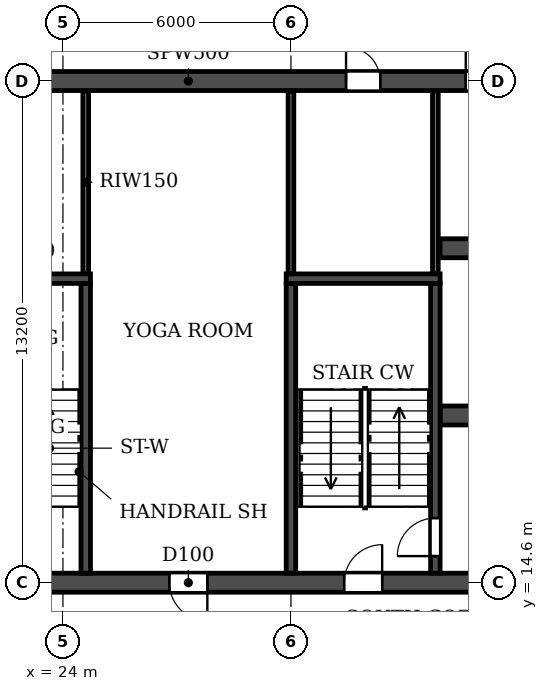
"""IFC4 building model, lengths in metres.
Left out: names, types, materials, properties, quantities, classifications, styles, units other than length and angle.
Written with IfcOpenShell. Run it as: python <this file> out.ifc"""

import sys

from ifc_helpers import new_model, si_unit, direction, frame, frame_2d, origin, place, context, subcontext, project, spatial, rectangle, extrude, element, fill, save


model = new_model("IFC4")
c1 = context("Model", 3, precision=1e-05, world=origin(), true_north=direction((0.0, 1.0)))
c2 = subcontext(c1, "Body", "Model", "MODEL_VIEW")
j1 = project(units=[si_unit("LENGTHUNIT", "METRE"), si_unit("PLANEANGLEUNIT", "RADIAN")], contexts=[c1])
p1 = place(None, origin())
s1 = spatial("IfcSite", under=j1, at=p1, CompositionType="ELEMENT")
p2 = place(p1, origin())
s2 = spatial("IfcBuilding", under=s1, at=p2, CompositionType="ELEMENT")
p3 = place(p2, frame((0.0, 0.0, 76.2)))
s3 = spatial("IfcBuildingStorey", under=s2, at=p3, CompositionType="ELEMENT", Elevation=76.2)
p4 = place(p3, frame((8.6, 14.6, 0.0), z_axis=(0.0, 0.0, 1.0), x_axis=(1.0, 0.0, 0.0)))
e1 = element("IfcWall", 1, at=p4, inside=s3, PredefinedType="SOLIDWALL", context=c2, shape_type="SweptSolid", body=[
    extrude(rectangle(XDim=84.8, YDim=0.5, at=frame_2d((42.4, 0.0))), origin(), (0.0, 0.0, 1.0), 3.06),
])
p5 = place(p4, frame((2.25, 0.0, 0.0)))
e2 = element("IfcOpeningElement", 2, at=p5, cuts=e1, PredefinedType="OPENING", context=c2, shape_type="SweptSolid", body=[
    extrude(rectangle(XDim=1.0, YDim=2.1, at=frame_2d((0.5, 1.05))), frame((0.0, 0.26, 0.0), z_axis=(0.0, -1.0, 0.0), x_axis=(1.0, 0.0, 0.0)), (0.0, 0.0, 1.0), 0.52),
])
p6 = place(p4, frame((6.95, 0.0, 0.0)))
e3 = element("IfcOpeningElement", 3, at=p6, cuts=e1, PredefinedType="OPENING", context=c2, shape_type="SweptSolid", body=[
    extrude(rectangle(XDim=1.0, YDim=2.1, at=frame_2d((0.5, 1.05))), frame((0.0, 0.26, 0.0), z_axis=(0.0, -1.0, 0.0), x_axis=(1.0, 0.0, 0.0)), (0.0, 0.0, 1.0), 0.52),
])
p7 = place(p4, frame((10.3, 0.0, 0.0)))
e4 = element("IfcOpeningElement", 4, at=p7, cuts=e1, PredefinedType="OPENING", context=c2, shape_type="SweptSolid", body=[
    extrude(rectangle(XDim=1.0, YDim=2.1, at=frame_2d((0.5, 1.05))), frame((0.0, 0.26, 0.0), z_axis=(0.0, -1.0, 0.0), x_axis=(1.0, 0.0, 0.0)), (0.0, 0.0, 1.0), 0.52),
])
p8 = place(p4, frame((18.2, 0.0, 0.0)))
e5 = element("IfcOpeningElement", 5, at=p8, cuts=e1, PredefinedType="OPENING", context=c2, shape_type="SweptSolid", body=[
    extrude(rectangle(XDim=1.0, YDim=2.1, at=frame_2d((0.5, 1.05))), frame((0.0, 0.26, 0.0), z_axis=(0.0, -1.0, 0.0), x_axis=(1.0, 0.0, 0.0)), (0.0, 0.0, 1.0), 0.52),
])
p9 = place(p4, frame((22.8, 0.0, 0.0)))
e6 = element("IfcOpeningElement", 6, at=p9, cuts=e1, PredefinedType="OPENING", context=c2, shape_type="SweptSolid", body=[
    extrude(rectangle(XDim=1.0, YDim=2.1, at=frame_2d((0.5, 1.05))), frame((0.0, 0.26, 0.0), z_axis=(0.0, -1.0, 0.0), x_axis=(1.0, 0.0, 0.0)), (0.0, 0.0, 1.0), 0.52),
])
p10 = place(p4, frame((35.4, 0.0, 0.0)))
e7 = element("IfcOpeningElement", 7, at=p10, cuts=e1, PredefinedType="OPENING", context=c2, shape_type="SweptSolid", body=[
    extrude(rectangle(XDim=1.0, YDim=2.1, at=frame_2d((0.5, 1.05))), frame((0.0, 0.26, 0.0), z_axis=(0.0, -1.0, 0.0), x_axis=(1.0, 0.0, 0.0)), (0.0, 0.0, 1.0), 0.52),
])
p11 = place(p4, frame((39.3, 0.0, 0.0)))
e8 = element("IfcOpeningElement", 8, at=p11, cuts=e1, PredefinedType="OPENING", context=c2, shape_type="SweptSolid", body=[
    extrude(rectangle(XDim=1.0, YDim=2.1, at=frame_2d((0.5, 1.05))), frame((0.0, 0.26, 0.0), z_axis=(0.0, -1.0, 0.0), x_axis=(1.0, 0.0, 0.0)), (0.0, 0.0, 1.0), 0.52),
])
p12 = place(p4, frame((41.9, 0.0, 0.0)))
e9 = element("IfcOpeningElement", 9, at=p12, cuts=e1, PredefinedType="OPENING", context=c2, shape_type="SweptSolid", body=[
    extrude(rectangle(XDim=1.0, YDim=2.1, at=frame_2d((0.5, 1.05))), frame((0.0, 0.26, 0.0), z_axis=(0.0, -1.0, 0.0), x_axis=(1.0, 0.0, 0.0)), (0.0, 0.0, 1.0), 0.52),
])
p13 = place(p4, frame((44.5, 0.0, 0.0)))
e10 = element("IfcOpeningElement", 10, at=p13, cuts=e1, PredefinedType="OPENING", context=c2, shape_type="SweptSolid", body=[
    extrude(rectangle(XDim=1.0, YDim=2.1, at=frame_2d((0.5, 1.05))), frame((0.0, 0.26, 0.0), z_axis=(0.0, -1.0, 0.0), x_axis=(1.0, 0.0, 0.0)), (0.0, 0.0, 1.0), 0.52),
])
p14 = place(p4, frame((48.4, 0.0, 0.0)))
e11 = element("IfcOpeningElement", 11, at=p14, cuts=e1, PredefinedType="OPENING", context=c2, shape_type="SweptSolid", body=[
    extrude(rectangle(XDim=1.0, YDim=2.1, at=frame_2d((0.5, 1.05))), frame((0.0, 0.26, 0.0), z_axis=(0.0, -1.0, 0.0), x_axis=(1.0, 0.0, 0.0)), (0.0, 0.0, 1.0), 0.52),
])
p15 = place(p4, frame((61.0, 0.0, 0.0)))
e12 = element("IfcOpeningElement", 12, at=p15, cuts=e1, PredefinedType="OPENING", context=c2, shape_type="SweptSolid", body=[
    extrude(rectangle(XDim=1.0, YDim=2.1, at=frame_2d((0.5, 1.05))), frame((0.0, 0.26, 0.0), z_axis=(0.0, -1.0, 0.0), x_axis=(1.0, 0.0, 0.0)), (0.0, 0.0, 1.0), 0.52),
])
p16 = place(p4, frame((65.6, 0.0, 0.0)))
e13 = element("IfcOpeningElement", 13, at=p16, cuts=e1, PredefinedType="OPENING", context=c2, shape_type="SweptSolid", body=[
    extrude(rectangle(XDim=1.0, YDim=2.1, at=frame_2d((0.5, 1.05))), frame((0.0, 0.26, 0.0), z_axis=(0.0, -1.0, 0.0), x_axis=(1.0, 0.0, 0.0)), (0.0, 0.0, 1.0), 0.52),
])
p17 = place(p4, frame((73.5, 0.0, 0.0)))
e14 = element("IfcOpeningElement", 14, at=p17, cuts=e1, PredefinedType="OPENING", context=c2, shape_type="SweptSolid", body=[
    extrude(rectangle(XDim=1.0, YDim=2.1, at=frame_2d((0.5, 1.05))), frame((0.0, 0.26, 0.0), z_axis=(0.0, -1.0, 0.0), x_axis=(1.0, 0.0, 0.0)), (0.0, 0.0, 1.0), 0.52),
])
p18 = place(p4, frame((76.55, 0.0, 0.0)))
e15 = element("IfcOpeningElement", 15, at=p18, cuts=e1, PredefinedType="OPENING", context=c2, shape_type="SweptSolid", body=[
    extrude(rectangle(XDim=1.0, YDim=2.1, at=frame_2d((0.5, 1.05))), frame((0.0, 0.26, 0.0), z_axis=(0.0, -1.0, 0.0), x_axis=(1.0, 0.0, 0.0)), (0.0, 0.0, 1.0), 0.52),
])
p19 = place(p4, frame((81.0, 0.0, 0.0)))
e16 = element("IfcOpeningElement", 16, at=p19, cuts=e1, PredefinedType="OPENING", context=c2, shape_type="SweptSolid", body=[
    extrude(rectangle(XDim=1.5, YDim=2.1, at=frame_2d((0.75, 1.05))), frame((0.0, 0.26, 0.0), z_axis=(0.0, -1.0, 0.0), x_axis=(1.0, 0.0, 0.0)), (0.0, 0.0, 1.0), 0.52),
])
p20 = place(p3, frame((8.6, 27.8, 0.0), z_axis=(0.0, 0.0, 1.0), x_axis=(1.0, 0.0, 0.0)))
e17 = element("IfcWall", 17, at=p20, inside=s3, PredefinedType="SOLIDWALL", context=c2, shape_type="SweptSolid", body=[
    extrude(rectangle(XDim=84.8, YDim=0.5, at=frame_2d((42.4, 0.0))), origin(), (0.0, 0.0, 1.0), 3.06),
])
p21 = place(p20, frame((2.0, 0.0, 0.0)))
e18 = element("IfcOpeningElement", 18, at=p21, cuts=e17, PredefinedType="OPENING", context=c2, shape_type="SweptSolid", body=[
    extrude(rectangle(XDim=1.5, YDim=2.1, at=frame_2d((0.75, 1.05))), frame((0.0, 0.26, 0.0), z_axis=(0.0, -1.0, 0.0), x_axis=(1.0, 0.0, 0.0)), (0.0, 0.0, 1.0), 0.52),
])
p22 = place(p20, frame((6.95, 0.0, 0.0)))
e19 = element("IfcOpeningElement", 19, at=p22, cuts=e17, PredefinedType="OPENING", context=c2, shape_type="SweptSolid", body=[
    extrude(rectangle(XDim=1.0, YDim=2.1, at=frame_2d((0.5, 1.05))), frame((0.0, 0.26, 0.0), z_axis=(0.0, -1.0, 0.0), x_axis=(1.0, 0.0, 0.0)), (0.0, 0.0, 1.0), 0.52),
])
p23 = place(p20, frame((10.3, 0.0, 0.0)))
e20 = element("IfcOpeningElement", 20, at=p23, cuts=e17, PredefinedType="OPENING", context=c2, shape_type="SweptSolid", body=[
    extrude(rectangle(XDim=1.0, YDim=2.1, at=frame_2d((0.5, 1.05))), frame((0.0, 0.26, 0.0), z_axis=(0.0, -1.0, 0.0), x_axis=(1.0, 0.0, 0.0)), (0.0, 0.0, 1.0), 0.52),
])
p24 = place(p20, frame((13.65, 0.0, 0.0)))
e21 = element("IfcOpeningElement", 21, at=p24, cuts=e17, PredefinedType="OPENING", context=c2, shape_type="SweptSolid", body=[
    extrude(rectangle(XDim=0.9, YDim=2.1, at=frame_2d((0.45, 1.05))), frame((0.0, 0.26, 0.0), z_axis=(0.0, -1.0, 0.0), x_axis=(1.0, 0.0, 0.0)), (0.0, 0.0, 1.0), 0.52),
])
p25 = place(p20, frame((22.85, 0.0, 0.0)))
e22 = element("IfcOpeningElement", 22, at=p25, cuts=e17, PredefinedType="OPENING", context=c2, shape_type="SweptSolid", body=[
    extrude(rectangle(XDim=0.9, YDim=2.1, at=frame_2d((0.45, 1.05))), frame((0.0, 0.26, 0.0), z_axis=(0.0, -1.0, 0.0), x_axis=(1.0, 0.0, 0.0)), (0.0, 0.0, 1.0), 0.52),
])
p26 = place(p20, frame((26.0, 0.0, 0.0)))
e23 = element("IfcOpeningElement", 23, at=p26, cuts=e17, PredefinedType="OPENING", context=c2, shape_type="SweptSolid", body=[
    extrude(rectangle(XDim=1.0, YDim=2.1, at=frame_2d((0.5, 1.05))), frame((0.0, 0.26, 0.0), z_axis=(0.0, -1.0, 0.0), x_axis=(1.0, 0.0, 0.0)), (0.0, 0.0, 1.0), 0.52),
])
p27 = place(p20, frame((31.2, 0.0, 0.0)))
e24 = element("IfcOpeningElement", 24, at=p27, cuts=e17, PredefinedType="OPENING", context=c2, shape_type="SweptSolid", body=[
    extrude(rectangle(XDim=1.0, YDim=2.1, at=frame_2d((0.5, 1.05))), frame((0.0, 0.26, 0.0), z_axis=(0.0, -1.0, 0.0), x_axis=(1.0, 0.0, 0.0)), (0.0, 0.0, 1.0), 0.52),
])
p28 = place(p20, frame((39.0, 0.0, 0.0)))
e25 = element("IfcOpeningElement", 25, at=p28, cuts=e17, PredefinedType="OPENING", context=c2, shape_type="SweptSolid", body=[
    extrude(rectangle(XDim=1.0, YDim=2.1, at=frame_2d((0.5, 1.05))), frame((0.0, 0.26, 0.0), z_axis=(0.0, -1.0, 0.0), x_axis=(1.0, 0.0, 0.0)), (0.0, 0.0, 1.0), 0.52),
])
p29 = place(p20, frame((41.9, 0.0, 0.0)))
e26 = element("IfcOpeningElement", 26, at=p29, cuts=e17, PredefinedType="OPENING", context=c2, shape_type="SweptSolid", body=[
    extrude(rectangle(XDim=1.0, YDim=2.1, at=frame_2d((0.5, 1.05))), frame((0.0, 0.26, 0.0), z_axis=(0.0, -1.0, 0.0), x_axis=(1.0, 0.0, 0.0)), (0.0, 0.0, 1.0), 0.52),
])
p30 = place(p20, frame((44.8, 0.0, 0.0)))
e27 = element("IfcOpeningElement", 27, at=p30, cuts=e17, PredefinedType="OPENING", context=c2, shape_type="SweptSolid", body=[
    extrude(rectangle(XDim=1.0, YDim=2.1, at=frame_2d((0.5, 1.05))), frame((0.0, 0.26, 0.0), z_axis=(0.0, -1.0, 0.0), x_axis=(1.0, 0.0, 0.0)), (0.0, 0.0, 1.0), 0.52),
])
p31 = place(p20, frame((48.7, 0.0, 0.0)))
e28 = element("IfcOpeningElement", 28, at=p31, cuts=e17, PredefinedType="OPENING", context=c2, shape_type="SweptSolid", body=[
    extrude(rectangle(XDim=1.0, YDim=2.1, at=frame_2d((0.5, 1.05))), frame((0.0, 0.26, 0.0), z_axis=(0.0, -1.0, 0.0), x_axis=(1.0, 0.0, 0.0)), (0.0, 0.0, 1.0), 0.52),
])
p32 = place(p20, frame((55.2, 0.0, 0.0)))
e29 = element("IfcOpeningElement", 29, at=p32, cuts=e17, PredefinedType="OPENING", context=c2, shape_type="SweptSolid", body=[
    extrude(rectangle(XDim=1.0, YDim=2.1, at=frame_2d((0.5, 1.05))), frame((0.0, 0.26, 0.0), z_axis=(0.0, -1.0, 0.0), x_axis=(1.0, 0.0, 0.0)), (0.0, 0.0, 1.0), 0.52),
])
p33 = place(p20, frame((61.05, 0.0, 0.0)))
e30 = element("IfcOpeningElement", 30, at=p33, cuts=e17, PredefinedType="OPENING", context=c2, shape_type="SweptSolid", body=[
    extrude(rectangle(XDim=0.9, YDim=2.1, at=frame_2d((0.45, 1.05))), frame((0.0, 0.26, 0.0), z_axis=(0.0, -1.0, 0.0), x_axis=(1.0, 0.0, 0.0)), (0.0, 0.0, 1.0), 0.52),
])
p34 = place(p20, frame((70.25, 0.0, 0.0)))
e31 = element("IfcOpeningElement", 31, at=p34, cuts=e17, PredefinedType="OPENING", context=c2, shape_type="SweptSolid", body=[
    extrude(rectangle(XDim=0.9, YDim=2.1, at=frame_2d((0.45, 1.05))), frame((0.0, 0.26, 0.0), z_axis=(0.0, -1.0, 0.0), x_axis=(1.0, 0.0, 0.0)), (0.0, 0.0, 1.0), 0.52),
])
p35 = place(p20, frame((73.5, 0.0, 0.0)))
e32 = element("IfcOpeningElement", 32, at=p35, cuts=e17, PredefinedType="OPENING", context=c2, shape_type="SweptSolid", body=[
    extrude(rectangle(XDim=1.0, YDim=2.1, at=frame_2d((0.5, 1.05))), frame((0.0, 0.26, 0.0), z_axis=(0.0, -1.0, 0.0), x_axis=(1.0, 0.0, 0.0)), (0.0, 0.0, 1.0), 0.52),
])
p36 = place(p20, frame((76.25, 0.0, 0.0)))
e33 = element("IfcOpeningElement", 33, at=p36, cuts=e17, PredefinedType="OPENING", context=c2, shape_type="SweptSolid", body=[
    extrude(rectangle(XDim=1.0, YDim=2.1, at=frame_2d((0.5, 1.05))), frame((0.0, 0.26, 0.0), z_axis=(0.0, -1.0, 0.0), x_axis=(1.0, 0.0, 0.0)), (0.0, 0.0, 1.0), 0.52),
])
p37 = place(p20, frame((80.95, 0.0, 0.0)))
e34 = element("IfcOpeningElement", 34, at=p37, cuts=e17, PredefinedType="OPENING", context=c2, shape_type="SweptSolid", body=[
    extrude(rectangle(XDim=1.0, YDim=2.1, at=frame_2d((0.5, 1.05))), frame((0.0, 0.26, 0.0), z_axis=(0.0, -1.0, 0.0), x_axis=(1.0, 0.0, 0.0)), (0.0, 0.0, 1.0), 0.52),
])
p38 = place(p3, frame((33.925, 19.0, 0.0), z_axis=(0.0, 0.0, 1.0), x_axis=(1.0, 0.0, 0.0)))
e35 = element("IfcWall", 35, at=p38, inside=s3, PredefinedType="SOLIDWALL", context=c2, shape_type="SweptSolid", body=[
    extrude(rectangle(XDim=34.15, YDim=0.5, at=frame_2d((17.075, 0.0))), origin(), (0.0, 0.0, 1.0), 3.06),
])
p39 = place(p38, frame((16.175, 0.0, 0.0)))
e36 = element("IfcOpeningElement", 36, at=p39, cuts=e35, PredefinedType="OPENING", context=c2, shape_type="SweptSolid", body=[
    extrude(rectangle(XDim=1.8, YDim=2.1, at=frame_2d((0.9, 1.05))), frame((0.0, 0.26, 0.0), z_axis=(0.0, -1.0, 0.0), x_axis=(1.0, 0.0, 0.0)), (0.0, 0.0, 1.0), 0.52),
])
p40 = place(p38, frame((1.525, 0.0, 0.0)))
e37 = element("IfcOpeningElement", 37, at=p40, cuts=e35, PredefinedType="OPENING", context=c2, shape_type="SweptSolid", body=[
    extrude(rectangle(XDim=1.8, YDim=2.1, at=frame_2d((0.9, 1.05))), frame((0.0, 0.26, 0.0), z_axis=(0.0, -1.0, 0.0), x_axis=(1.0, 0.0, 0.0)), (0.0, 0.0, 1.0), 0.52),
])
p41 = place(p38, frame((8.725, 0.0, 0.0)))
e38 = element("IfcOpeningElement", 38, at=p41, cuts=e35, PredefinedType="OPENING", context=c2, shape_type="SweptSolid", body=[
    extrude(rectangle(XDim=1.1, YDim=2.1, at=frame_2d((0.55, 1.05))), frame((0.0, 0.26, 0.0), z_axis=(0.0, -1.0, 0.0), x_axis=(1.0, 0.0, 0.0)), (0.0, 0.0, 1.0), 0.52),
])
p42 = place(p38, frame((11.325, 0.0, 0.0)))
e39 = element("IfcOpeningElement", 39, at=p42, cuts=e35, PredefinedType="OPENING", context=c2, shape_type="SweptSolid", body=[
    extrude(rectangle(XDim=1.1, YDim=2.1, at=frame_2d((0.55, 1.05))), frame((0.0, 0.26, 0.0), z_axis=(0.0, -1.0, 0.0), x_axis=(1.0, 0.0, 0.0)), (0.0, 0.0, 1.0), 0.52),
])
p43 = place(p38, frame((13.925, 0.0, 0.0)))
e40 = element("IfcOpeningElement", 40, at=p43, cuts=e35, PredefinedType="OPENING", context=c2, shape_type="SweptSolid", body=[
    extrude(rectangle(XDim=1.1, YDim=2.1, at=frame_2d((0.55, 1.05))), frame((0.0, 0.26, 0.0), z_axis=(0.0, -1.0, 0.0), x_axis=(1.0, 0.0, 0.0)), (0.0, 0.0, 1.0), 0.52),
])
p44 = place(p38, frame((19.125, 0.0, 0.0)))
e41 = element("IfcOpeningElement", 41, at=p44, cuts=e35, PredefinedType="OPENING", context=c2, shape_type="SweptSolid", body=[
    extrude(rectangle(XDim=1.1, YDim=2.1, at=frame_2d((0.55, 1.05))), frame((0.0, 0.26, 0.0), z_axis=(0.0, -1.0, 0.0), x_axis=(1.0, 0.0, 0.0)), (0.0, 0.0, 1.0), 0.52),
])
p45 = place(p38, frame((21.725, 0.0, 0.0)))
e42 = element("IfcOpeningElement", 42, at=p45, cuts=e35, PredefinedType="OPENING", context=c2, shape_type="SweptSolid", body=[
    extrude(rectangle(XDim=1.1, YDim=2.1, at=frame_2d((0.55, 1.05))), frame((0.0, 0.26, 0.0), z_axis=(0.0, -1.0, 0.0), x_axis=(1.0, 0.0, 0.0)), (0.0, 0.0, 1.0), 0.52),
])
p46 = place(p38, frame((24.325, 0.0, 0.0)))
e43 = element("IfcOpeningElement", 43, at=p46, cuts=e35, PredefinedType="OPENING", context=c2, shape_type="SweptSolid", body=[
    extrude(rectangle(XDim=1.1, YDim=2.1, at=frame_2d((0.55, 1.05))), frame((0.0, 0.26, 0.0), z_axis=(0.0, -1.0, 0.0), x_axis=(1.0, 0.0, 0.0)), (0.0, 0.0, 1.0), 0.52),
])
p47 = place(p38, frame((30.825, 0.0, 0.0)))
e44 = element("IfcOpeningElement", 44, at=p47, cuts=e35, PredefinedType="OPENING", context=c2, shape_type="SweptSolid", body=[
    extrude(rectangle(XDim=1.8, YDim=2.1, at=frame_2d((0.9, 1.05))), frame((0.0, 0.26, 0.0), z_axis=(0.0, -1.0, 0.0), x_axis=(1.0, 0.0, 0.0)), (0.0, 0.0, 1.0), 0.52),
])
p48 = place(p3, frame((33.925, 23.4, 0.0), z_axis=(0.0, 0.0, 1.0), x_axis=(1.0, 0.0, 0.0)))
e45 = element("IfcWall", 45, at=p48, inside=s3, PredefinedType="SOLIDWALL", context=c2, shape_type="SweptSolid", body=[
    extrude(rectangle(XDim=34.15, YDim=0.5, at=frame_2d((17.075, 0.0))), origin(), (0.0, 0.0, 1.0), 3.06),
])
p49 = place(p48, frame((16.175, 0.0, 0.0)))
e46 = element("IfcOpeningElement", 46, at=p49, cuts=e45, PredefinedType="OPENING", context=c2, shape_type="SweptSolid", body=[
    extrude(rectangle(XDim=1.8, YDim=2.1, at=frame_2d((0.9, 1.05))), frame((0.0, 0.26, 0.0), z_axis=(0.0, -1.0, 0.0), x_axis=(1.0, 0.0, 0.0)), (0.0, 0.0, 1.0), 0.52),
])
p50 = place(p48, frame((11.025, 0.0, 0.0)))
e47 = element("IfcOpeningElement", 47, at=p50, cuts=e45, PredefinedType="OPENING", context=c2, shape_type="SweptSolid", body=[
    extrude(rectangle(XDim=1.1, YDim=2.1, at=frame_2d((0.55, 1.05))), frame((0.0, 0.26, 0.0), z_axis=(0.0, -1.0, 0.0), x_axis=(1.0, 0.0, 0.0)), (0.0, 0.0, 1.0), 0.52),
])
p51 = place(p3, frame((30.0, 14.85, 0.0), z_axis=(0.0, 0.0, 1.0), x_axis=(0.0, 1.0, 0.0)))
e48 = element("IfcWall", 48, at=p51, inside=s3, PredefinedType="SOLIDWALL", context=c2, shape_type="SweptSolid", body=[
    extrude(rectangle(XDim=7.625, YDim=0.25, at=frame_2d((3.812, 0.0))), origin(), (0.0, 0.0, 1.0), 3.06),
])
p52 = place(p3, frame((33.8, 14.85, 0.0), z_axis=(0.0, 0.0, 1.0), x_axis=(0.0, 1.0, 0.0)))
e49 = element("IfcWall", 49, at=p52, inside=s3, PredefinedType="SOLIDWALL", context=c2, shape_type="SweptSolid", body=[
    extrude(rectangle(XDim=7.625, YDim=0.25, at=frame_2d((3.812, 0.0))), origin(), (0.0, 0.0, 1.0), 3.06),
])
p53 = place(p52, frame((0.45, 0.0, 0.0)))
e50 = element("IfcOpeningElement", 50, at=p53, cuts=e49, PredefinedType="OPENING", context=c2, shape_type="SweptSolid", body=[
    extrude(rectangle(XDim=1.0, YDim=2.1, at=frame_2d((0.5, 1.05))), frame((0.0, 0.135, 0.0), z_axis=(0.0, -1.0, 0.0), x_axis=(1.0, 0.0, 0.0)), (0.0, 0.0, 1.0), 0.27),
])
p54 = place(p3, frame((29.875, 22.6, 0.0), z_axis=(0.0, 0.0, 1.0), x_axis=(1.0, 0.0, 0.0)))
e51 = element("IfcWall", 51, at=p54, inside=s3, PredefinedType="SOLIDWALL", context=c2, shape_type="SweptSolid", body=[
    extrude(rectangle(XDim=4.05, YDim=0.25, at=frame_2d((2.025, 0.0))), origin(), (0.0, 0.0, 1.0), 3.06),
])
p55 = place(p3, frame((24.6, 14.85, 0.0), z_axis=(0.0, 0.0, 1.0), x_axis=(0.0, 1.0, 0.0)))
e52 = element("IfcWall", 52, at=p55, inside=s3, PredefinedType="SOLIDWALL", context=c2, shape_type="SweptSolid", body=[
    extrude(rectangle(XDim=7.625, YDim=0.25, at=frame_2d((3.812, 0.0))), origin(), (0.0, 0.0, 1.0), 3.06),
])
p56 = place(p3, frame((20.675, 22.6, 0.0), z_axis=(0.0, 0.0, 1.0), x_axis=(1.0, 0.0, 0.0)))
e53 = element("IfcWall", 53, at=p56, inside=s3, PredefinedType="SOLIDWALL", context=c2, shape_type="SweptSolid", body=[
    extrude(rectangle(XDim=4.05, YDim=0.25, at=frame_2d((2.025, 0.0))), origin(), (0.0, 0.0, 1.0), 3.06),
])
for number, where, z_axis, x_axis in (
    (54, (24.6, 22.735, 0.0), (0.0, 0.0, 1.0), (0.0, 1.0, 0.0)),
    (55, (30.0, 22.735, 0.0), (0.0, 0.0, 1.0), (0.0, 1.0, 0.0)),
    (56, (33.8, 22.735, 0.0), (0.0, 0.0, 1.0), (0.0, 1.0, 0.0)),
):
    element("IfcWall", number, at=place(p3, frame(where, z_axis=z_axis, x_axis=x_axis)), inside=s3, PredefinedType="PARTITIONING", context=c2, shape_type="SweptSolid", body=[
        extrude(rectangle(XDim=4.805, YDim=0.15, at=frame_2d((2.402, 0.0))), origin(), (0.0, 0.0, 1.0), 3.06),
    ])
p57 = place(p25, origin())
e57 = element("IfcDoor", 57, at=p57, inside=s3, OperationType="SINGLE_SWING_LEFT", PredefinedType="DOOR", context=c2, shape_type="SweptSolid", body=[
    extrude(rectangle(XDim=0.9, YDim=2.1, at=frame_2d((0.45, 1.05))), frame((0.0, 0.025, 0.0), z_axis=(0.0, -1.0, 0.0), x_axis=(1.0, 0.0, 0.0)), (0.0, 0.0, 1.0), 0.05),
])
fill(e22, e57)
p58 = place(p26, origin())
e58 = element("IfcDoor", 58, at=p58, inside=s3, OperationType="SINGLE_SWING_LEFT", PredefinedType="DOOR", context=c2, shape_type="SweptSolid", body=[
    extrude(rectangle(XDim=1.0, YDim=2.1, at=frame_2d((0.5, 1.05))), frame((0.0, 0.025, 0.0), z_axis=(0.0, -1.0, 0.0), x_axis=(1.0, 0.0, 0.0)), (0.0, 0.0, 1.0), 0.05),
])
fill(e23, e58)
p59 = place(p8, frame((1.0, 0.0, 0.0), z_axis=(0.0, 0.0, 1.0), x_axis=(-1.0, 0.0, 0.0)))
e59 = element("IfcDoor", 59, at=p59, inside=s3, OperationType="SINGLE_SWING_LEFT", PredefinedType="DOOR", context=c2, shape_type="SweptSolid", body=[
    extrude(rectangle(XDim=1.0, YDim=2.1, at=frame_2d((0.5, 1.05))), frame((0.0, 0.025, 0.0), z_axis=(0.0, -1.0, 0.0), x_axis=(1.0, 0.0, 0.0)), (0.0, 0.0, 1.0), 0.05),
])
fill(e5, e59)
p60 = place(p9, origin())
e60 = element("IfcDoor", 60, at=p60, inside=s3, OperationType="SINGLE_SWING_RIGHT", PredefinedType="DOOR", context=c2, shape_type="SweptSolid", body=[
    extrude(rectangle(XDim=1.0, YDim=2.1, at=frame_2d((0.5, 1.05))), frame((0.0, 0.025, 0.0), z_axis=(0.0, -1.0, 0.0), x_axis=(1.0, 0.0, 0.0)), (0.0, 0.0, 1.0), 0.05),
])
fill(e6, e60)
p61 = place(p53, origin())
e61 = element("IfcDoor", 61, at=p61, inside=s3, OperationType="SINGLE_SWING_LEFT", PredefinedType="DOOR", context=c2, shape_type="SweptSolid", body=[
    extrude(rectangle(XDim=1.0, YDim=2.1, at=frame_2d((0.5, 1.05))), frame((0.0, 0.025, 0.0), z_axis=(0.0, -1.0, 0.0), x_axis=(1.0, 0.0, 0.0)), (0.0, 0.0, 1.0), 0.05),
])
fill(e50, e61)
save(model, sys.argv[1])
